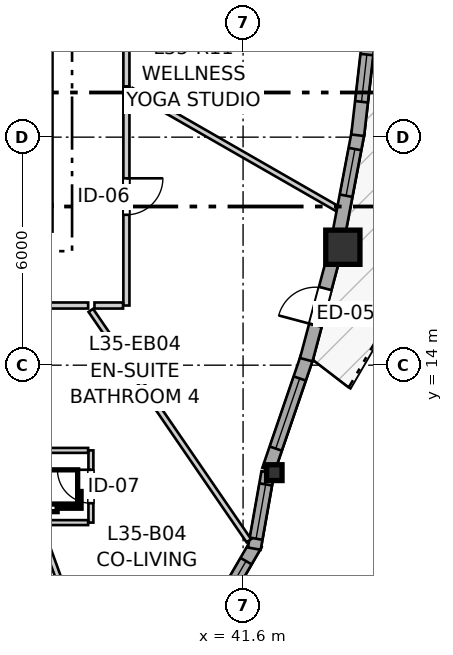
"""IFC4 building model, lengths in metres.
Left out: names, types, materials, properties, quantities, classifications, styles, units other than length and angle.
Written with IfcOpenShell. Run it as: python <this file> out.ifc"""

import sys

from ifc_helpers import new_model, si_unit, direction, frame, frame_2d, origin, origin_2d, place, context, subcontext, project, spatial, rectangle, i_section, extrude, source, transform, mapped, element, fill, save


model = new_model("IFC4")
c1 = context("Model", 3, precision=1e-05, world=origin(), true_north=direction((0.0, 1.0)))
c2 = subcontext(c1, "Body", "Model", "MODEL_VIEW")
j1 = project(units=[si_unit("LENGTHUNIT", "METRE"), si_unit("PLANEANGLEUNIT", "RADIAN")], contexts=[c1])
p1 = place(None, origin())
s1 = spatial("IfcSite", under=j1, at=p1, CompositionType="ELEMENT")
p2 = place(p1, origin())
s2 = spatial("IfcBuilding", under=s1, at=p2, CompositionType="ELEMENT")
p3 = place(p2, frame((0.0, 0.0, 118.4)))
s3 = spatial("IfcBuildingStorey", under=s2, at=p3, CompositionType="ELEMENT", Elevation=118.4)
m1 = source(origin(), c2, "Body", "SweptSolid", [
    extrude(i_section(OverallWidth=0.406, OverallDepth=0.416, WebThickness=0.027, FlangeThickness=0.044, FilletRadius=0.015, at=origin_2d()), origin(), (0.0, 0.0, 1.0), 2.95),
])
p4 = place(p3, frame((42.423, 11.172, 0.0), z_axis=(0.0, 0.0, 1.0), x_axis=(1.0, 0.0, 0.0)))
e1 = element("IfcColumn", 1, at=p4, inside=s3, PredefinedType="PILASTER", context=c2, shape_type="MappedRepresentation", body=[
    mapped(m1, transform((0.0, 0.0, 0.0), x_axis=(1.0, 0.0, 0.0), y_axis=(0.0, 1.0, 0.0), z_axis=(0.0, 0.0, 1.0), scale=1.0)),
])
m2 = source(origin(), c2, "Body", "SweptSolid", [
    extrude(rectangle(XDim=0.9, YDim=0.9, at=origin_2d()), origin(), (0.0, 0.0, 1.0), 2.95),
])
p5 = place(p3, frame((44.226, 17.104, 0.0), z_axis=(0.0, 0.0, 1.0), x_axis=(1.0, 0.0, 0.0)))
e2 = element("IfcColumn", 2, at=p5, inside=s3, PredefinedType="COLUMN", context=c2, shape_type="MappedRepresentation", body=[
    mapped(m2, transform((0.0, 0.0, 0.0), x_axis=(1.0, 0.0, 0.0), y_axis=(0.0, 1.0, 0.0), z_axis=(0.0, 0.0, 1.0), scale=1.0)),
])
p6 = place(p3, frame((40.888, 7.483, 0.0), z_axis=(0.0, 0.0, 1.0), x_axis=(0.501902596059, 0.864924149315, 0.0)))
e3 = element("IfcWall", 3, at=p6, inside=s3, PredefinedType="SOLIDWALL", context=c2, shape_type="SweptSolid", body=[
    extrude(rectangle(XDim=2.099, YDim=0.34, at=frame_2d((1.049, 0.0))), origin(), (0.0, 0.0, 1.0), 2.48),
])
p7 = place(p6, frame((0.524, 0.0, 0.82)))
e4 = element("IfcOpeningElement", 4, at=p7, cuts=e3, PredefinedType="OPENING", context=c2, shape_type="SweptSolid", body=[
    extrude(rectangle(XDim=1.05, YDim=1.45, at=frame_2d((0.525, 0.725))), frame((0.0, 0.18, 0.0), z_axis=(0.0, -1.0, 0.0), x_axis=(1.0, 0.0, 0.0)), (0.0, 0.0, 1.0), 0.36),
])
p8 = place(p3, frame((41.896, 9.173, 0.0), z_axis=(0.0, 0.0, 1.0), x_axis=(0.174399433509, 0.984674990843, 0.0)))
e5 = element("IfcWall", 5, at=p8, inside=s3, PredefinedType="SOLIDWALL", context=c2, shape_type="SweptSolid", body=[
    extrude(rectangle(XDim=2.041, YDim=0.34, at=frame_2d((1.021, 0.0))), origin(), (0.0, 0.0, 1.0), 2.48),
])
p9 = place(p8, frame((0.267, 0.0, 0.82)))
e6 = element("IfcOpeningElement", 6, at=p9, cuts=e5, PredefinedType="OPENING", context=c2, shape_type="SweptSolid", body=[
    extrude(rectangle(XDim=1.45, YDim=1.25, at=frame_2d((0.725, 0.625))), frame((0.0, 0.18, 0.0), z_axis=(0.0, -1.0, 0.0), x_axis=(1.0, 0.0, 0.0)), (0.0, 0.0, 1.0), 0.36),
])
p10 = place(p3, frame((42.268, 11.246, 0.0), z_axis=(0.0, 0.0, 1.0), x_axis=(0.323583674973, 0.946199558915, 0.0)))
e7 = element("IfcWall", 7, at=p10, inside=s3, PredefinedType="SOLIDWALL", context=c2, shape_type="SweptSolid", body=[
    extrude(rectangle(XDim=3.152, YDim=0.34, at=frame_2d((1.576, 0.0))), origin(), (0.0, 0.0, 1.0), 2.48),
])
p11 = place(p10, frame((0.591, 0.0, 0.82)))
e8 = element("IfcOpeningElement", 8, at=p11, cuts=e7, PredefinedType="OPENING", context=c2, shape_type="SweptSolid", body=[
    extrude(rectangle(XDim=1.95, YDim=1.4, at=frame_2d((0.975, 0.7))), frame((0.0, 0.18, 0.0), z_axis=(0.0, -1.0, 0.0), x_axis=(1.0, 0.0, 0.0)), (0.0, 0.0, 1.0), 0.36),
])
p12 = place(p3, frame((43.263, 14.145, 0.0), z_axis=(0.0, 0.0, 1.0), x_axis=(0.257086792151, 0.96638831807, 0.0)))
e9 = element("IfcWall", 9, at=p12, inside=s3, PredefinedType="SOLIDWALL", context=c2, shape_type="SweptSolid", body=[
    extrude(rectangle(XDim=2.876, YDim=0.34, at=frame_2d((1.438, 0.0))), origin(), (0.0, 0.0, 1.0), 2.48),
])
p13 = place(p12, frame((0.938, 0.0, 0.0)))
e10 = element("IfcOpeningElement", 10, at=p13, cuts=e9, PredefinedType="OPENING", context=c2, shape_type="SweptSolid", body=[
    extrude(rectangle(XDim=1.0, YDim=2.1, at=frame_2d((0.5, 1.05))), frame((0.0, 0.18, 0.0), z_axis=(0.0, -1.0, 0.0), x_axis=(1.0, 0.0, 0.0)), (0.0, 0.0, 1.0), 0.36),
])
p14 = place(p3, frame((44.101, 17.361, 0.0), z_axis=(0.0, 0.0, 1.0), x_axis=(0.186739007234, 0.982409559795, 0.0)))
e11 = element("IfcWall", 11, at=p14, inside=s3, PredefinedType="SOLIDWALL", context=c2, shape_type="SweptSolid", body=[
    extrude(rectangle(XDim=2.827, YDim=0.34, at=frame_2d((1.413, 0.0))), origin(), (0.0, 0.0, 1.0), 2.48),
])
p15 = place(p14, frame((1.118, 0.0, 0.82)))
e12 = element("IfcOpeningElement", 12, at=p15, cuts=e11, PredefinedType="OPENING", context=c2, shape_type="SweptSolid", body=[
    extrude(rectangle(XDim=1.25, YDim=1.35, at=frame_2d((0.625, 0.675))), frame((0.0, 0.18, 0.0), z_axis=(0.0, -1.0, 0.0), x_axis=(1.0, 0.0, 0.0)), (0.0, 0.0, 1.0), 0.36),
])
p16 = place(p3, frame((44.616, 20.05, 0.0), z_axis=(0.0, 0.0, 1.0), x_axis=(0.113250801133, 0.993566432627, 0.0)))
e13 = element("IfcWall", 13, at=p16, inside=s3, PredefinedType="SOLIDWALL", context=c2, shape_type="SweptSolid", body=[
    extrude(rectangle(XDim=3.003, YDim=0.34, at=frame_2d((1.501, 0.0))), origin(), (0.0, 0.0, 1.0), 2.48),
])
p17 = place(p16, frame((0.886, 0.0, 0.82)))
e14 = element("IfcOpeningElement", 14, at=p17, cuts=e13, PredefinedType="OPENING", context=c2, shape_type="SweptSolid", body=[
    extrude(rectangle(XDim=1.25, YDim=1.35, at=frame_2d((0.625, 0.675))), frame((0.0, 0.18, 0.0), z_axis=(0.0, -1.0, 0.0), x_axis=(1.0, 0.0, 0.0)), (0.0, 0.0, 1.0), 0.36),
])
p18 = place(p3, frame((38.53, 21.321, 0.0), z_axis=(0.0, 0.0, 1.0), x_axis=(0.0, -1.0, 0.0)))
e15 = element("IfcWall", 15, at=p18, inside=s3, PredefinedType="PARTITIONING", context=c2, shape_type="SweptSolid", body=[
    extrude(rectangle(XDim=5.751, YDim=0.16, at=frame_2d((2.875, 0.0))), origin(), (0.0, 0.0, 1.0), 2.95),
])
p19 = place(p18, frame((2.404, 0.0, 0.0)))
e16 = element("IfcOpeningElement", 16, at=p19, cuts=e15, PredefinedType="OPENING", context=c2, shape_type="SweptSolid", body=[
    extrude(rectangle(XDim=0.96, YDim=2.1, at=frame_2d((0.48, 1.05))), frame((0.0, 0.09, 0.0), z_axis=(0.0, -1.0, 0.0), x_axis=(1.0, 0.0, 0.0)), (0.0, 0.0, 1.0), 0.18),
])
p20 = place(p3, frame((38.53, 26.147, 0.0), z_axis=(0.0, 0.0, 1.0), x_axis=(0.0, -1.0, 0.0)))
e17 = element("IfcWall", 17, at=p20, inside=s3, PredefinedType="PARTITIONING", context=c2, shape_type="SweptSolid", body=[
    extrude(rectangle(XDim=4.811, YDim=0.16, at=frame_2d((2.406, 0.0))), origin(), (0.0, 0.0, 1.0), 2.95),
])
p21 = place(p20, frame((1.949, 0.0, 0.0)))
e18 = element("IfcOpeningElement", 18, at=p21, cuts=e17, PredefinedType="OPENING", context=c2, shape_type="SweptSolid", body=[
    extrude(rectangle(XDim=0.96, YDim=2.1, at=frame_2d((0.48, 1.05))), frame((0.0, 0.09, 0.0), z_axis=(0.0, -1.0, 0.0), x_axis=(1.0, 0.0, 0.0)), (0.0, 0.0, 1.0), 0.18),
])
p22 = place(p3, frame((37.524, 15.57, 0.0), z_axis=(0.0, 0.0, 1.0), x_axis=(-1.0, 0.0, 0.0)))
e19 = element("IfcWall", 19, at=p22, inside=s3, PredefinedType="PARTITIONING", context=c2, shape_type="SweptSolid", body=[
    extrude(rectangle(XDim=3.401, YDim=0.16, at=frame_2d((1.7, 0.0))), origin(), (0.0, 0.0, 1.0), 2.95),
])
p23 = place(p22, frame((1.241, 0.0, 0.0)))
e20 = element("IfcOpeningElement", 20, at=p23, cuts=e19, PredefinedType="OPENING", context=c2, shape_type="SweptSolid", body=[
    extrude(rectangle(XDim=0.92, YDim=2.1, at=frame_2d((0.46, 1.05))), frame((0.0, 0.09, 0.0), z_axis=(0.0, -1.0, 0.0), x_axis=(1.0, 0.0, 0.0)), (0.0, 0.0, 1.0), 0.18),
])
p24 = place(p3, frame((37.596, 9.858, 0.0), z_axis=(0.0, 0.0, 1.0), x_axis=(0.0, 1.0, 0.0)))
e21 = element("IfcWall", 21, at=p24, inside=s3, PredefinedType="PARTITIONING", context=c2, shape_type="SweptSolid", body=[
    extrude(rectangle(XDim=1.9, YDim=0.13, at=frame_2d((0.95, 0.0))), origin(), (0.0, 0.0, 1.0), 2.95),
])
p25 = place(p24, frame((0.51, 0.0, 0.0)))
e22 = element("IfcOpeningElement", 22, at=p25, cuts=e21, PredefinedType="OPENING", context=c2, shape_type="SweptSolid", body=[
    extrude(rectangle(XDim=0.88, YDim=2.05, at=frame_2d((0.44, 1.025))), frame((0.0, 0.075, 0.0), z_axis=(0.0, -1.0, 0.0), x_axis=(1.0, 0.0, 0.0)), (0.0, 0.0, 1.0), 0.15),
])
p26 = place(p3, frame((37.594, 15.442, 0.0), z_axis=(0.0, 0.0, 1.0), x_axis=(0.565681325722, -0.824623937155, 0.0)))
e23 = element("IfcWall", 23, at=p26, inside=s3, PredefinedType="PARTITIONING", context=c2, shape_type="SweptSolid", body=[
    extrude(rectangle(XDim=7.35, YDim=0.145, at=frame_2d((3.675, 0.0))), origin(), (0.0, 0.0, 1.0), 2.95),
])
p27 = place(p3, frame((38.653, 21.233, 0.0), z_axis=(0.0, 0.0, 1.0), x_axis=(0.86726592845, -0.49784516604, 0.0)))
e24 = element("IfcWall", 24, at=p27, inside=s3, PredefinedType="PARTITIONING", context=c2, shape_type="SweptSolid", body=[
    extrude(rectangle(XDim=6.237, YDim=0.145, at=frame_2d((3.119, 0.0))), origin(), (0.0, 0.0, 1.0), 2.95),
])
p28 = place(p3, frame((36.208, 9.873, 0.0), z_axis=(0.0, 0.0, 1.0), x_axis=(0.341362804218, -0.939931612351, 0.0)))
e25 = element("IfcWall", 25, at=p28, inside=s3, PredefinedType="PARTITIONING", context=c2, shape_type="SweptSolid", body=[
    extrude(rectangle(XDim=4.279, YDim=0.145, at=frame_2d((2.14, 0.0))), origin(), (0.0, 0.0, 1.0), 2.95),
])
p29 = place(p3, frame((35.796, 11.758, 0.0), z_axis=(0.0, 0.0, 1.0), x_axis=(1.0, 0.0, 0.0)))
e26 = element("IfcWall", 26, at=p29, inside=s3, PredefinedType="PARTITIONING", context=c2, shape_type="SweptSolid", body=[
    extrude(rectangle(XDim=1.727, YDim=0.13, at=frame_2d((0.864, 0.0))), origin(), (0.0, 0.0, 1.0), 2.95),
])
p30 = place(p3, frame((36.323, 9.858, 0.0), z_axis=(0.0, 0.0, 1.0), x_axis=(1.0, 0.0, 0.0)))
e27 = element("IfcWall", 27, at=p30, inside=s3, PredefinedType="PARTITIONING", context=c2, shape_type="SweptSolid", body=[
    extrude(rectangle(XDim=1.2, YDim=0.13, at=frame_2d((0.6, 0.0))), origin(), (0.0, 0.0, 1.0), 2.95),
])
p31 = place(p3, frame((37.69, 15.57, 0.0), z_axis=(0.0, 0.0, 1.0), x_axis=(1.0, 0.0, 0.0)))
e28 = element("IfcWall", 28, at=p31, inside=s3, PredefinedType="PARTITIONING", context=c2, shape_type="SweptSolid", body=[
    extrude(rectangle(XDim=0.752, YDim=0.16, at=frame_2d((0.376, 0.0))), origin(), (0.0, 0.0, 1.0), 2.95),
])
m3 = source(origin(), c2, "Body", "SweptSolid", [
    extrude(rectangle(XDim=1.05, YDim=1.45, at=frame_2d((0.525, 0.725))), frame((0.0, 0.03, 0.0), z_axis=(0.0, -1.0, 0.0), x_axis=(1.0, 0.0, 0.0)), (0.0, 0.0, 1.0), 0.06),
])
p32 = place(p7, origin())
e29 = element("IfcWindow", 29, at=p32, inside=s3, PartitioningType="SINGLE_PANEL", PredefinedType="WINDOW", context=c2, shape_type="MappedRepresentation", body=[
    mapped(m3, transform((0.0, 0.0, 0.0), x_axis=(1.0, 0.0, 0.0), y_axis=(0.0, 1.0, 0.0), z_axis=(0.0, 0.0, 1.0), scale=1.0)),
])
fill(e4, e29)
m4 = source(origin(), c2, "Body", "SweptSolid", [
    extrude(rectangle(XDim=1.45, YDim=1.25, at=frame_2d((0.725, 0.625))), frame((0.0, 0.03, 0.0), z_axis=(0.0, -1.0, 0.0), x_axis=(1.0, 0.0, 0.0)), (0.0, 0.0, 1.0), 0.06),
])
p33 = place(p9, origin())
e30 = element("IfcWindow", 30, at=p33, inside=s3, PartitioningType="SINGLE_PANEL", PredefinedType="WINDOW", context=c2, shape_type="MappedRepresentation", body=[
    mapped(m4, transform((0.0, 0.0, 0.0), x_axis=(1.0, 0.0, 0.0), y_axis=(0.0, 1.0, 0.0), z_axis=(0.0, 0.0, 1.0), scale=1.0)),
])
fill(e6, e30)
m5 = source(origin(), c2, "Body", "SweptSolid", [
    extrude(rectangle(XDim=1.95, YDim=1.4, at=frame_2d((0.975, 0.7))), frame((0.0, 0.03, 0.0), z_axis=(0.0, -1.0, 0.0), x_axis=(1.0, 0.0, 0.0)), (0.0, 0.0, 1.0), 0.06),
])
p34 = place(p11, origin())
e31 = element("IfcWindow", 31, at=p34, inside=s3, PartitioningType="SINGLE_PANEL", PredefinedType="WINDOW", context=c2, shape_type="MappedRepresentation", body=[
    mapped(m5, transform((0.0, 0.0, 0.0), x_axis=(1.0, 0.0, 0.0), y_axis=(0.0, 1.0, 0.0), z_axis=(0.0, 0.0, 1.0), scale=1.0)),
])
fill(e8, e31)
m6 = source(origin(), c2, "Body", "SweptSolid", [
    extrude(rectangle(XDim=1.25, YDim=1.35, at=frame_2d((0.625, 0.675))), frame((0.0, 0.03, 0.0), z_axis=(0.0, -1.0, 0.0), x_axis=(1.0, 0.0, 0.0)), (0.0, 0.0, 1.0), 0.06),
])
p35 = place(p15, origin())
e32 = element("IfcWindow", 32, at=p35, inside=s3, PartitioningType="SINGLE_PANEL", PredefinedType="WINDOW", context=c2, shape_type="MappedRepresentation", body=[
    mapped(m6, transform((0.0, 0.0, 0.0), x_axis=(1.0, 0.0, 0.0), y_axis=(0.0, 1.0, 0.0), z_axis=(0.0, 0.0, 1.0), scale=1.0)),
])
fill(e12, e32)
p36 = place(p17, origin())
e33 = element("IfcWindow", 33, at=p36, inside=s3, PartitioningType="SINGLE_PANEL", PredefinedType="WINDOW", context=c2, shape_type="MappedRepresentation", body=[
    mapped(m6, transform((0.0, 0.0, 0.0), x_axis=(1.0, 0.0, 0.0), y_axis=(0.0, 1.0, 0.0), z_axis=(0.0, 0.0, 1.0), scale=1.0)),
])
fill(e14, e33)
m7 = source(origin(), c2, "Body", "SweptSolid", [
    extrude(rectangle(XDim=1.0, YDim=2.1, at=frame_2d((0.5, 1.05))), frame((0.0, 0.025, 0.0), z_axis=(0.0, -1.0, 0.0), x_axis=(1.0, 0.0, 0.0)), (0.0, 0.0, 1.0), 0.05),
])
p37 = place(p13, origin())
e34 = element("IfcDoor", 34, at=p37, inside=s3, OperationType="SINGLE_SWING_LEFT", PredefinedType="DOOR", context=c2, shape_type="MappedRepresentation", body=[
    mapped(m7, transform((0.0, 0.0, 0.0), x_axis=(1.0, 0.0, 0.0), y_axis=(0.0, 1.0, 0.0), z_axis=(0.0, 0.0, 1.0), scale=1.0)),
])
fill(e10, e34)
m8 = source(origin(), c2, "Body", "SweptSolid", [
    extrude(rectangle(XDim=0.96, YDim=2.1, at=frame_2d((0.48, 1.05))), frame((0.0, 0.025, 0.0), z_axis=(0.0, -1.0, 0.0), x_axis=(1.0, 0.0, 0.0)), (0.0, 0.0, 1.0), 0.05),
])
p38 = place(p19, origin())
e35 = element("IfcDoor", 35, at=p38, inside=s3, OperationType="SINGLE_SWING_LEFT", PredefinedType="DOOR", context=c2, shape_type="MappedRepresentation", body=[
    mapped(m8, transform((0.0, 0.0, 0.0), x_axis=(1.0, 0.0, 0.0), y_axis=(0.0, 1.0, 0.0), z_axis=(0.0, 0.0, 1.0), scale=1.0)),
])
fill(e16, e35)
m9 = source(origin(), c2, "Body", "SweptSolid", [
    extrude(rectangle(XDim=0.88, YDim=2.05, at=frame_2d((0.44, 1.025))), frame((0.0, 0.025, 0.0), z_axis=(0.0, -1.0, 0.0), x_axis=(1.0, 0.0, 0.0)), (0.0, 0.0, 1.0), 0.05),
])
p39 = place(p25, origin())
e36 = element("IfcDoor", 36, at=p39, inside=s3, OperationType="SINGLE_SWING_RIGHT", PredefinedType="DOOR", context=c2, shape_type="MappedRepresentation", body=[
    mapped(m9, transform((0.0, 0.0, 0.0), x_axis=(1.0, 0.0, 0.0), y_axis=(0.0, 1.0, 0.0), z_axis=(0.0, 0.0, 1.0), scale=1.0)),
])
fill(e22, e36)
save(model, sys.argv[1])
